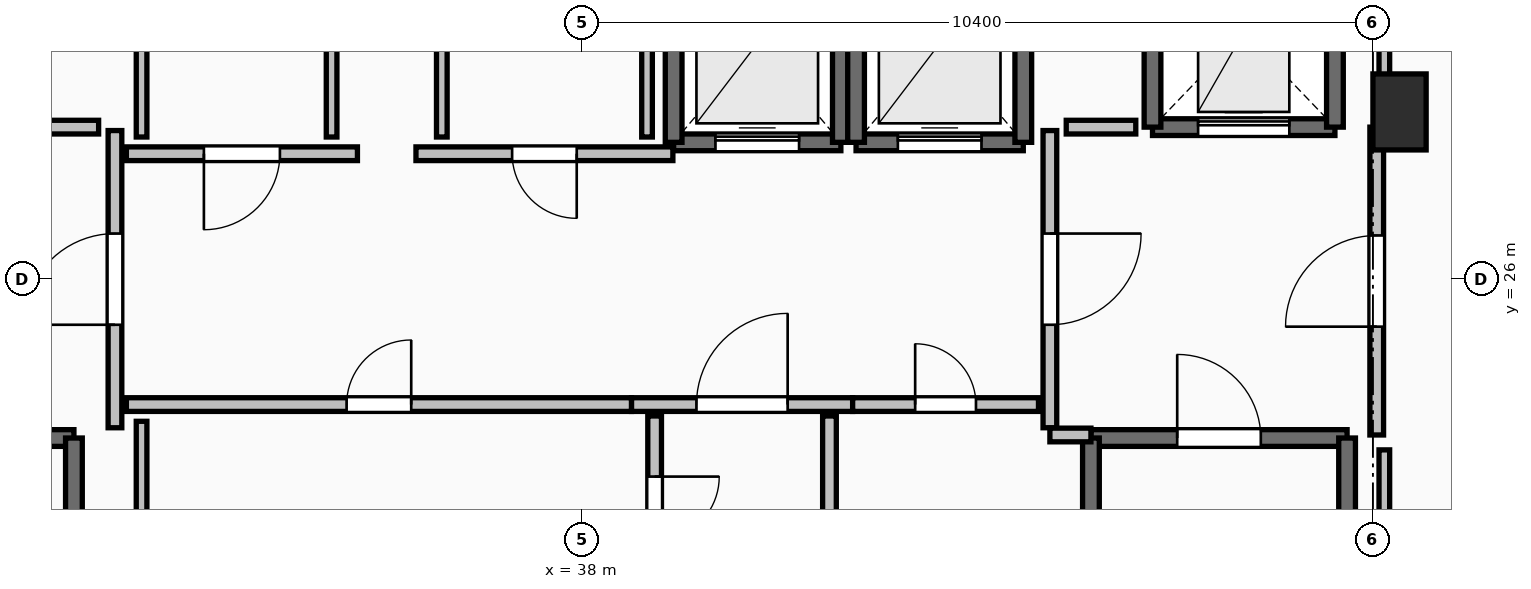
"""IFC4 building model, lengths in metres.
Left out: names, types, materials, properties, quantities, classifications, styles, units other than length and angle.
Written with IfcOpenShell. Run it as: python <this file> out.ifc"""

import sys

from ifc_helpers import new_model, si_unit, direction, frame, frame_2d, origin, origin_2d, place, context, subcontext, project, spatial, rectangle, extrude, element, fill, save


model = new_model("IFC4")
c1 = context("Model", 3, precision=1e-05, world=origin(), true_north=direction((0.0, 1.0)))
c2 = subcontext(c1, "Body", "Model", "MODEL_VIEW")
j1 = project(units=[si_unit("LENGTHUNIT", "METRE"), si_unit("PLANEANGLEUNIT", "RADIAN")], contexts=[c1])
p1 = place(None, origin())
s1 = spatial("IfcSite", under=j1, at=p1, CompositionType="ELEMENT")
p2 = place(p1, origin())
s2 = spatial("IfcBuilding", under=s1, at=p2, CompositionType="ELEMENT")
p3 = place(p2, frame((0.0, 0.0, 259.1)))
s3 = spatial("IfcBuildingStorey", under=s2, at=p3, CompositionType="ELEMENT", Elevation=259.1)
p4 = place(p3, frame((48.75, 28.2, 0.0), z_axis=(0.0, 0.0, 1.0), x_axis=(1.0, 0.0, 0.0)))
e1 = element("IfcColumn", 1, at=p4, inside=s3, PredefinedType="PILASTER", context=c2, shape_type="SweptSolid", body=[
    extrude(rectangle(XDim=0.7, YDim=1.0, at=origin_2d()), origin(), (0.0, 0.0, 1.0), 3.55),
])
p5 = place(p3, frame((27.94, 23.91, 0.0), z_axis=(0.0, 0.0, 1.0), x_axis=(1.0, 0.0, 0.0)))
e2 = element("IfcWall", 2, at=p5, inside=s3, PredefinedType="SOLIDWALL", context=c2, shape_type="SweptSolid", body=[
    extrude(rectangle(XDim=3.37, YDim=0.22, at=frame_2d((1.685, 0.0))), origin(), (0.0, 0.0, 1.0), 3.29),
])
p6 = place(p5, frame((1.135, 0.0, 0.0)))
e3 = element("IfcOpeningElement", 3, at=p6, cuts=e2, PredefinedType="OPENING", context=c2, shape_type="SweptSolid", body=[
    extrude(rectangle(XDim=1.1, YDim=2.15, at=frame_2d((0.55, 1.075))), frame((0.0, 0.125, 0.0), z_axis=(0.0, -1.0, 0.0), x_axis=(1.0, 0.0, 0.0)), (0.0, 0.0, 1.0), 0.25),
])
p7 = place(p3, frame((31.31, 23.91, 0.0), z_axis=(0.0, 0.0, 1.0), x_axis=(0.0, -1.0, 0.0)))
e4 = element("IfcWall", 4, at=p7, inside=s3, PredefinedType="SOLIDWALL", context=c2, shape_type="SweptSolid", body=[
    extrude(rectangle(XDim=7.42, YDim=0.22, at=frame_2d((3.71, 0.0))), origin(), (0.0, 0.0, 1.0), 3.29),
])
p8 = place(p3, frame((44.69, 23.91, 0.0), z_axis=(0.0, 0.0, 1.0), x_axis=(1.0, 0.0, 0.0)))
e5 = element("IfcWall", 5, at=p8, inside=s3, PredefinedType="SOLIDWALL", context=c2, shape_type="SweptSolid", body=[
    extrude(rectangle(XDim=3.37, YDim=0.22, at=frame_2d((1.685, 0.0))), origin(), (0.0, 0.0, 1.0), 3.29),
])
p9 = place(p8, frame((1.135, 0.0, 0.0)))
e6 = element("IfcOpeningElement", 6, at=p9, cuts=e5, PredefinedType="OPENING", context=c2, shape_type="SweptSolid", body=[
    extrude(rectangle(XDim=1.1, YDim=2.15, at=frame_2d((0.55, 1.075))), frame((0.0, 0.125, 0.0), z_axis=(0.0, -1.0, 0.0), x_axis=(1.0, 0.0, 0.0)), (0.0, 0.0, 1.0), 0.25),
])
for number, where, z_axis, x_axis in (
    (7, (48.06, 23.91, 0.0), (0.0, 0.0, 1.0), (0.0, -1.0, 0.0)),
    (8, (44.69, 16.49, 0.0), (0.0, 0.0, 1.0), (0.0, 1.0, 0.0)),
):
    element("IfcWall", number, at=place(p3, frame(where, z_axis=z_axis, x_axis=x_axis)), inside=s3, PredefinedType="SOLIDWALL", context=c2, shape_type="SweptSolid", body=[
        extrude(rectangle(XDim=7.42, YDim=0.22, at=frame_2d((3.71, 0.0))), origin(), (0.0, 0.0, 1.0), 3.29),
    ])
p10 = place(p3, frame((39.2, 27.8, 0.0), z_axis=(0.0, 0.0, 1.0), x_axis=(1.0, 0.0, 0.0)))
e9 = element("IfcWall", 9, at=p10, inside=s3, PredefinedType="SOLIDWALL", context=c2, shape_type="SweptSolid", body=[
    extrude(rectangle(XDim=2.2, YDim=0.22, at=frame_2d((1.1, 0.0))), origin(), (0.0, 0.0, 1.0), 3.29),
])
p11 = place(p10, frame((0.55, 0.0, 0.0)))
e10 = element("IfcOpeningElement", 10, at=p11, cuts=e9, PredefinedType="OPENING", context=c2, shape_type="SweptSolid", body=[
    extrude(rectangle(XDim=1.1, YDim=2.2, at=frame_2d((0.55, 1.1))), frame((0.0, 0.125, 0.0), z_axis=(0.0, -1.0, 0.0), x_axis=(1.0, 0.0, 0.0)), (0.0, 0.0, 1.0), 0.25),
])
for number, where, z_axis, x_axis in (
    (11, (41.4, 27.8, 0.0), (0.0, 0.0, 1.0), (0.0, 1.0, 0.0)),
    (12, (39.2, 30.4, 0.0), (0.0, 0.0, 1.0), (0.0, -1.0, 0.0)),
):
    element("IfcWall", number, at=place(p3, frame(where, z_axis=z_axis, x_axis=x_axis)), inside=s3, PredefinedType="SOLIDWALL", context=c2, shape_type="SweptSolid", body=[
        extrude(rectangle(XDim=2.6, YDim=0.22, at=frame_2d((1.3, 0.0))), origin(), (0.0, 0.0, 1.0), 3.29),
    ])
p12 = place(p3, frame((41.6, 27.8, 0.0), z_axis=(0.0, 0.0, 1.0), x_axis=(1.0, 0.0, 0.0)))
e13 = element("IfcWall", 13, at=p12, inside=s3, PredefinedType="SOLIDWALL", context=c2, shape_type="SweptSolid", body=[
    extrude(rectangle(XDim=2.2, YDim=0.22, at=frame_2d((1.1, 0.0))), origin(), (0.0, 0.0, 1.0), 3.29),
])
p13 = place(p12, frame((0.55, 0.0, 0.0)))
e14 = element("IfcOpeningElement", 14, at=p13, cuts=e13, PredefinedType="OPENING", context=c2, shape_type="SweptSolid", body=[
    extrude(rectangle(XDim=1.1, YDim=2.2, at=frame_2d((0.55, 1.1))), frame((0.0, 0.125, 0.0), z_axis=(0.0, -1.0, 0.0), x_axis=(1.0, 0.0, 0.0)), (0.0, 0.0, 1.0), 0.25),
])
for number, where, z_axis, x_axis in (
    (15, (43.8, 27.8, 0.0), (0.0, 0.0, 1.0), (0.0, 1.0, 0.0)),
    (16, (41.6, 30.4, 0.0), (0.0, 0.0, 1.0), (0.0, -1.0, 0.0)),
):
    element("IfcWall", number, at=place(p3, frame(where, z_axis=z_axis, x_axis=x_axis)), inside=s3, PredefinedType="SOLIDWALL", context=c2, shape_type="SweptSolid", body=[
        extrude(rectangle(XDim=2.6, YDim=0.22, at=frame_2d((1.3, 0.0))), origin(), (0.0, 0.0, 1.0), 3.29),
    ])
p14 = place(p3, frame((45.5, 28.0, 0.0), z_axis=(0.0, 0.0, 1.0), x_axis=(1.0, 0.0, 0.0)))
e17 = element("IfcWall", 17, at=p14, inside=s3, PredefinedType="SHEAR", context=c2, shape_type="SweptSolid", body=[
    extrude(rectangle(XDim=2.4, YDim=0.22, at=frame_2d((1.2, 0.0))), origin(), (0.0, 0.0, 1.0), 3.29),
])
p15 = place(p14, frame((0.6, 0.0, 0.0)))
e18 = element("IfcOpeningElement", 18, at=p15, cuts=e17, PredefinedType="OPENING", context=c2, shape_type="SweptSolid", body=[
    extrude(rectangle(XDim=1.2, YDim=2.2, at=frame_2d((0.6, 1.1))), frame((0.0, 0.125, 0.0), z_axis=(0.0, -1.0, 0.0), x_axis=(1.0, 0.0, 0.0)), (0.0, 0.0, 1.0), 0.25),
])
for number, where, z_axis, x_axis in (
    (19, (47.9, 28.0, 0.0), (0.0, 0.0, 1.0), (0.0, 1.0, 0.0)),
    (20, (45.5, 30.5, 0.0), (0.0, 0.0, 1.0), (0.0, -1.0, 0.0)),
):
    element("IfcWall", number, at=place(p3, frame(where, z_axis=z_axis, x_axis=x_axis)), inside=s3, PredefinedType="SHEAR", context=c2, shape_type="SweptSolid", body=[
        extrude(rectangle(XDim=2.5, YDim=0.22, at=frame_2d((1.25, 0.0))), origin(), (0.0, 0.0, 1.0), 3.29),
    ])
p16 = place(p3, frame((31.85, 24.045, 0.0), z_axis=(0.0, 0.0, 1.0), x_axis=(0.0, 1.0, 0.0)))
e21 = element("IfcWall", 21, at=p16, inside=s3, PredefinedType="PARTITIONING", context=c2, shape_type="SweptSolid", body=[
    extrude(rectangle(XDim=3.91, YDim=0.18, at=frame_2d((1.955, 0.0))), origin(), (0.0, 0.0, 1.0), 3.29),
])
p17 = place(p16, frame((1.355, 0.0, 0.0)))
e22 = element("IfcOpeningElement", 22, at=p17, cuts=e21, PredefinedType="OPENING", context=c2, shape_type="SweptSolid", body=[
    extrude(rectangle(XDim=1.2, YDim=2.15, at=frame_2d((0.6, 1.075))), frame((0.0, 0.105, 0.0), z_axis=(0.0, -1.0, 0.0), x_axis=(1.0, 0.0, 0.0)), (0.0, 0.0, 1.0), 0.21),
])
p18 = place(p3, frame((44.15, 27.955, 0.0), z_axis=(0.0, 0.0, 1.0), x_axis=(0.0, -1.0, 0.0)))
e23 = element("IfcWall", 23, at=p18, inside=s3, PredefinedType="PARTITIONING", context=c2, shape_type="SweptSolid", body=[
    extrude(rectangle(XDim=3.91, YDim=0.18, at=frame_2d((1.955, 0.0))), origin(), (0.0, 0.0, 1.0), 3.29),
])
p19 = place(p18, frame((1.355, 0.0, 0.0)))
e24 = element("IfcOpeningElement", 24, at=p19, cuts=e23, PredefinedType="OPENING", context=c2, shape_type="SweptSolid", body=[
    extrude(rectangle(XDim=1.2, YDim=2.15, at=frame_2d((0.6, 1.075))), frame((0.0, 0.105, 0.0), z_axis=(0.0, -1.0, 0.0), x_axis=(1.0, 0.0, 0.0)), (0.0, 0.0, 1.0), 0.21),
])
p20 = place(p3, frame((44.15, 23.95, 0.0), z_axis=(0.0, 0.0, 1.0), x_axis=(1.0, 0.0, 0.0)))
e25 = element("IfcWall", 25, at=p20, inside=s3, PredefinedType="PARTITIONING", context=c2, shape_type="SweptSolid", body=[
    extrude(rectangle(XDim=0.54, YDim=0.18, at=frame_2d((0.27, 0.0))), origin(), (0.0, 0.0, 1.0), 3.29),
])
p21 = place(p3, frame((48.45, 23.95, 0.0), z_axis=(0.0, 0.0, 1.0), x_axis=(0.0, 1.0, 0.0)))
e26 = element("IfcWall", 26, at=p21, inside=s3, PredefinedType="PARTITIONING", context=c2, shape_type="SweptSolid", body=[
    extrude(rectangle(XDim=4.05, YDim=0.18, at=frame_2d((2.025, 0.0))), origin(), (0.0, 0.0, 1.0), 3.29),
])
p22 = place(p21, frame((1.425, 0.0, 0.0)))
e27 = element("IfcOpeningElement", 27, at=p22, cuts=e26, PredefinedType="OPENING", context=c2, shape_type="SweptSolid", body=[
    extrude(rectangle(XDim=1.2, YDim=2.15, at=frame_2d((0.6, 1.075))), frame((0.0, 0.105, 0.0), z_axis=(0.0, -1.0, 0.0), x_axis=(1.0, 0.0, 0.0)), (0.0, 0.0, 1.0), 0.21),
])
p23 = place(p3, frame((38.645, 24.35, 0.0), z_axis=(0.0, 0.0, 1.0), x_axis=(1.0, 0.0, 0.0)))
e28 = element("IfcWall", 28, at=p23, inside=s3, PredefinedType="PARTITIONING", context=c2, shape_type="SweptSolid", body=[
    extrude(rectangle(XDim=2.91, YDim=0.18, at=frame_2d((1.455, 0.0))), origin(), (0.0, 0.0, 1.0), 3.29),
])
p24 = place(p23, frame((0.855, 0.0, 0.0)))
e29 = element("IfcOpeningElement", 29, at=p24, cuts=e28, PredefinedType="OPENING", context=c2, shape_type="SweptSolid", body=[
    extrude(rectangle(XDim=1.2, YDim=2.15, at=frame_2d((0.6, 1.075))), frame((0.0, 0.105, 0.0), z_axis=(0.0, -1.0, 0.0), x_axis=(1.0, 0.0, 0.0)), (0.0, 0.0, 1.0), 0.21),
])
p25 = place(p3, frame((41.555, 24.35, 0.0), z_axis=(0.0, 0.0, 1.0), x_axis=(1.0, 0.0, 0.0)))
e30 = element("IfcWall", 30, at=p25, inside=s3, PredefinedType="PARTITIONING", context=c2, shape_type="SweptSolid", body=[
    extrude(rectangle(XDim=2.445, YDim=0.18, at=frame_2d((1.223, 0.0))), origin(), (0.0, 0.0, 1.0), 3.29),
])
p26 = place(p25, frame((0.823, 0.0, 0.0)))
e31 = element("IfcOpeningElement", 31, at=p26, cuts=e30, PredefinedType="OPENING", context=c2, shape_type="SweptSolid", body=[
    extrude(rectangle(XDim=0.8, YDim=2.05, at=frame_2d((0.4, 1.025))), frame((0.0, 0.105, 0.0), z_axis=(0.0, -1.0, 0.0), x_axis=(1.0, 0.0, 0.0)), (0.0, 0.0, 1.0), 0.21),
])
p27 = place(p3, frame((35.04, 27.65, 0.0), z_axis=(0.0, 0.0, 1.0), x_axis=(-1.0, 0.0, 0.0)))
e32 = element("IfcWall", 32, at=p27, inside=s3, PredefinedType="PARTITIONING", context=c2, shape_type="SweptSolid", body=[
    extrude(rectangle(XDim=3.04, YDim=0.18, at=frame_2d((1.52, 0.0))), origin(), (0.0, 0.0, 1.0), 3.29),
])
p28 = place(p27, frame((1.02, 0.0, 0.0)))
e33 = element("IfcOpeningElement", 33, at=p28, cuts=e32, PredefinedType="OPENING", context=c2, shape_type="SweptSolid", body=[
    extrude(rectangle(XDim=1.0, YDim=2.15, at=frame_2d((0.5, 1.075))), frame((0.0, 0.105, 0.0), z_axis=(0.0, -1.0, 0.0), x_axis=(1.0, 0.0, 0.0)), (0.0, 0.0, 1.0), 0.21),
])
p29 = place(p3, frame((39.19, 27.65, 0.0), z_axis=(0.0, 0.0, 1.0), x_axis=(-1.0, 0.0, 0.0)))
e34 = element("IfcWall", 34, at=p29, inside=s3, PredefinedType="PARTITIONING", context=c2, shape_type="SweptSolid", body=[
    extrude(rectangle(XDim=3.38, YDim=0.18, at=frame_2d((1.69, 0.0))), origin(), (0.0, 0.0, 1.0), 3.29),
])
p30 = place(p29, frame((1.265, 0.0, 0.0)))
e35 = element("IfcOpeningElement", 35, at=p30, cuts=e34, PredefinedType="OPENING", context=c2, shape_type="SweptSolid", body=[
    extrude(rectangle(XDim=0.85, YDim=2.1, at=frame_2d((0.425, 1.05))), frame((0.0, 0.105, 0.0), z_axis=(0.0, -1.0, 0.0), x_axis=(1.0, 0.0, 0.0)), (0.0, 0.0, 1.0), 0.21),
])
p31 = place(p3, frame((32.0, 24.35, 0.0), z_axis=(0.0, 0.0, 1.0), x_axis=(1.0, 0.0, 0.0)))
e36 = element("IfcWall", 36, at=p31, inside=s3, PredefinedType="PARTITIONING", context=c2, shape_type="SweptSolid", body=[
    extrude(rectangle(XDim=6.645, YDim=0.18, at=frame_2d((3.323, 0.0))), origin(), (0.0, 0.0, 1.0), 3.29),
])
p32 = place(p31, frame((2.897, 0.0, 0.0)))
e37 = element("IfcOpeningElement", 37, at=p32, cuts=e36, PredefinedType="OPENING", context=c2, shape_type="SweptSolid", body=[
    extrude(rectangle(XDim=0.85, YDim=2.1, at=frame_2d((0.425, 1.05))), frame((0.0, 0.105, 0.0), z_axis=(0.0, -1.0, 0.0), x_axis=(1.0, 0.0, 0.0)), (0.0, 0.0, 1.0), 0.21),
])
p33 = place(p3, frame((41.25, 16.32, 0.0), z_axis=(0.0, 0.0, 1.0), x_axis=(0.0, 1.0, 0.0)))
e38 = element("IfcWall", 38, at=p33, inside=s3, PredefinedType="PARTITIONING", context=c2, shape_type="SweptSolid", body=[
    extrude(rectangle(XDim=7.88, YDim=0.18, at=frame_2d((3.94, 0.0))), origin(), (0.0, 0.0, 1.0), 2.482),
])
p34 = place(p33, frame((3.54, 0.0, 0.0)))
e39 = element("IfcOpeningElement", 39, at=p34, cuts=e38, PredefinedType="OPENING", context=c2, shape_type="SweptSolid", body=[
    extrude(rectangle(XDim=0.8, YDim=2.05, at=frame_2d((0.4, 1.025))), frame((0.0, 0.105, 0.0), z_axis=(0.0, -1.0, 0.0), x_axis=(1.0, 0.0, 0.0)), (0.0, 0.0, 1.0), 0.21),
])
p35 = place(p3, frame((38.95, 24.2, 0.0), z_axis=(0.0, 0.0, 1.0), x_axis=(0.0, -1.0, 0.0)))
e40 = element("IfcWall", 40, at=p35, inside=s3, PredefinedType="PARTITIONING", context=c2, shape_type="SweptSolid", body=[
    extrude(rectangle(XDim=2.445, YDim=0.18, at=frame_2d((1.223, 0.0))), origin(), (0.0, 0.0, 1.0), 2.482),
])
p36 = place(p35, frame((0.798, 0.0, 0.0)))
e41 = element("IfcOpeningElement", 41, at=p36, cuts=e40, PredefinedType="OPENING", context=c2, shape_type="SweptSolid", body=[
    extrude(rectangle(XDim=0.85, YDim=2.1, at=frame_2d((0.425, 1.05))), frame((0.0, 0.105, 0.0), z_axis=(0.0, -1.0, 0.0), x_axis=(1.0, 0.0, 0.0)), (0.0, 0.0, 1.0), 0.21),
])
for number, where, z_axis, x_axis in (
    (42, (31.635, 28.0, 0.0), (0.0, 0.0, 1.0), (-1.0, 0.0, 0.0)),
    (43, (45.28, 28.0, 0.0), (0.0, 0.0, 1.0), (-1.0, 0.0, 0.0)),
):
    element("IfcWall", number, at=place(p3, frame(where, z_axis=z_axis, x_axis=x_axis)), inside=s3, PredefinedType="PARTITIONING", context=c2, shape_type="SweptSolid", body=[
        extrude(rectangle(XDim=0.915, YDim=0.18, at=frame_2d((0.458, 0.0))), origin(), (0.0, 0.0, 1.0), 3.29),
    ])
for number, where, z_axis, x_axis in (
    (44, (32.2, 30.26, 0.0), (0.0, 0.0, 1.0), (0.0, -1.0, 0.0)),
    (45, (34.7, 27.87, 0.0), (0.0, 0.0, 1.0), (0.0, 1.0, 0.0)),
):
    element("IfcWall", number, at=place(p3, frame(where, z_axis=z_axis, x_axis=x_axis)), inside=s3, PredefinedType="PARTITIONING", context=c2, shape_type="SweptSolid", body=[
        extrude(rectangle(XDim=2.39, YDim=0.14, at=frame_2d((1.195, 0.0))), origin(), (0.0, 0.0, 1.0), 3.29),
    ])
p37 = place(p3, frame((36.15, 30.03, 0.0), z_axis=(0.0, 0.0, 1.0), x_axis=(0.0, -1.0, 0.0)))
e46 = element("IfcWall", 46, at=p37, inside=s3, PredefinedType="PARTITIONING", context=c2, shape_type="SweptSolid", body=[
    extrude(rectangle(XDim=2.16, YDim=0.14, at=frame_2d((1.08, 0.0))), origin(), (0.0, 0.0, 1.0), 3.29),
])
p38 = place(p3, frame((38.85, 27.87, 0.0), z_axis=(0.0, 0.0, 1.0), x_axis=(0.0, 1.0, 0.0)))
e47 = element("IfcWall", 47, at=p38, inside=s3, PredefinedType="PARTITIONING", context=c2, shape_type="SweptSolid", body=[
    extrude(rectangle(XDim=2.39, YDim=0.14, at=frame_2d((1.195, 0.0))), origin(), (0.0, 0.0, 1.0), 3.29),
])
p39 = place(p3, frame((32.2, 24.13, 0.0), z_axis=(0.0, 0.0, 1.0), x_axis=(0.0, -1.0, 0.0)))
e48 = element("IfcWall", 48, at=p39, inside=s3, PredefinedType="PARTITIONING", context=c2, shape_type="SweptSolid", body=[
    extrude(rectangle(XDim=2.46, YDim=0.14, at=frame_2d((1.23, 0.0))), origin(), (0.0, 0.0, 1.0), 2.482),
])
p40 = place(p3, frame((48.55, 16.24, 0.0), z_axis=(0.0, 0.0, 1.0), x_axis=(0.0, 1.0, 0.0)))
e49 = element("IfcWall", 49, at=p40, inside=s3, PredefinedType="PARTITIONING", context=c2, shape_type="SweptSolid", body=[
    extrude(rectangle(XDim=7.514, YDim=0.14, at=frame_2d((3.757, 0.0))), origin(), (0.0, 0.0, 1.0), 2.482),
])
p41 = place(p3, frame((48.55, 28.196, 0.0), z_axis=(0.0, 0.0, 1.0), x_axis=(0.0, 1.0, 0.0)))
e50 = element("IfcWall", 50, at=p41, inside=s3, PredefinedType="PARTITIONING", context=c2, shape_type="SweptSolid", body=[
    extrude(rectangle(XDim=5.254, YDim=0.14, at=frame_2d((2.627, 0.0))), origin(), (0.0, 0.0, 1.0), 2.482),
])
p42 = place(p9, origin())
e51 = element("IfcDoor", 51, at=p42, inside=s3, OperationType="SINGLE_SWING_LEFT", PredefinedType="DOOR", context=c2, shape_type="SweptSolid", body=[
    extrude(rectangle(XDim=1.1, YDim=2.15, at=frame_2d((0.55, 1.075))), frame((0.0, 0.025, 0.0), z_axis=(0.0, -1.0, 0.0), x_axis=(1.0, 0.0, 0.0)), (0.0, 0.0, 1.0), 0.05),
])
fill(e6, e51)
p43 = place(p11, origin())
e52 = element("IfcDoor", 52, at=p43, inside=s3, OperationType="SLIDING_TO_LEFT", PredefinedType="DOOR", context=c2, shape_type="SweptSolid", body=[
    extrude(rectangle(XDim=1.1, YDim=2.2, at=frame_2d((0.55, 1.1))), frame((0.0, 0.025, 0.0), z_axis=(0.0, -1.0, 0.0), x_axis=(1.0, 0.0, 0.0)), (0.0, 0.0, 1.0), 0.05),
])
fill(e10, e52)
p44 = place(p13, origin())
e53 = element("IfcDoor", 53, at=p44, inside=s3, OperationType="SLIDING_TO_LEFT", PredefinedType="DOOR", context=c2, shape_type="SweptSolid", body=[
    extrude(rectangle(XDim=1.1, YDim=2.2, at=frame_2d((0.55, 1.1))), frame((0.0, 0.025, 0.0), z_axis=(0.0, -1.0, 0.0), x_axis=(1.0, 0.0, 0.0)), (0.0, 0.0, 1.0), 0.05),
])
fill(e14, e53)
p45 = place(p15, origin())
e54 = element("IfcDoor", 54, at=p45, inside=s3, OperationType="SLIDING_TO_LEFT", PredefinedType="DOOR", context=c2, shape_type="SweptSolid", body=[
    extrude(rectangle(XDim=1.2, YDim=2.2, at=frame_2d((0.6, 1.1))), frame((0.0, 0.025, 0.0), z_axis=(0.0, -1.0, 0.0), x_axis=(1.0, 0.0, 0.0)), (0.0, 0.0, 1.0), 0.05),
])
fill(e18, e54)
p46 = place(p17, origin())
e55 = element("IfcDoor", 55, at=p46, inside=s3, OperationType="SINGLE_SWING_LEFT", PredefinedType="DOOR", context=c2, shape_type="SweptSolid", body=[
    extrude(rectangle(XDim=1.2, YDim=2.15, at=frame_2d((0.6, 1.075))), frame((0.0, 0.025, 0.0), z_axis=(0.0, -1.0, 0.0), x_axis=(1.0, 0.0, 0.0)), (0.0, 0.0, 1.0), 0.05),
])
fill(e22, e55)
p47 = place(p19, origin())
e56 = element("IfcDoor", 56, at=p47, inside=s3, OperationType="SINGLE_SWING_LEFT", PredefinedType="DOOR", context=c2, shape_type="SweptSolid", body=[
    extrude(rectangle(XDim=1.2, YDim=2.15, at=frame_2d((0.6, 1.075))), frame((0.0, 0.025, 0.0), z_axis=(0.0, -1.0, 0.0), x_axis=(1.0, 0.0, 0.0)), (0.0, 0.0, 1.0), 0.05),
])
fill(e24, e56)
p48 = place(p22, origin())
e57 = element("IfcDoor", 57, at=p48, inside=s3, OperationType="SINGLE_SWING_LEFT", PredefinedType="DOOR", context=c2, shape_type="SweptSolid", body=[
    extrude(rectangle(XDim=1.2, YDim=2.15, at=frame_2d((0.6, 1.075))), frame((0.0, 0.025, 0.0), z_axis=(0.0, -1.0, 0.0), x_axis=(1.0, 0.0, 0.0)), (0.0, 0.0, 1.0), 0.05),
])
fill(e27, e57)
p49 = place(p24, origin())
e58 = element("IfcDoor", 58, at=p49, inside=s3, OperationType="SINGLE_SWING_RIGHT", PredefinedType="DOOR", context=c2, shape_type="SweptSolid", body=[
    extrude(rectangle(XDim=1.2, YDim=2.15, at=frame_2d((0.6, 1.075))), frame((0.0, 0.025, 0.0), z_axis=(0.0, -1.0, 0.0), x_axis=(1.0, 0.0, 0.0)), (0.0, 0.0, 1.0), 0.05),
])
fill(e29, e58)
p50 = place(p26, origin())
e59 = element("IfcDoor", 59, at=p50, inside=s3, OperationType="SINGLE_SWING_LEFT", PredefinedType="DOOR", context=c2, shape_type="SweptSolid", body=[
    extrude(rectangle(XDim=0.8, YDim=2.05, at=frame_2d((0.4, 1.025))), frame((0.0, 0.025, 0.0), z_axis=(0.0, -1.0, 0.0), x_axis=(1.0, 0.0, 0.0)), (0.0, 0.0, 1.0), 0.05),
])
fill(e31, e59)
p51 = place(p28, origin())
e60 = element("IfcDoor", 60, at=p51, inside=s3, OperationType="SINGLE_SWING_RIGHT", PredefinedType="DOOR", context=c2, shape_type="SweptSolid", body=[
    extrude(rectangle(XDim=1.0, YDim=2.15, at=frame_2d((0.5, 1.075))), frame((0.0, 0.025, 0.0), z_axis=(0.0, -1.0, 0.0), x_axis=(1.0, 0.0, 0.0)), (0.0, 0.0, 1.0), 0.05),
])
fill(e33, e60)
p52 = place(p30, origin())
e61 = element("IfcDoor", 61, at=p52, inside=s3, OperationType="SINGLE_SWING_LEFT", PredefinedType="DOOR", context=c2, shape_type="SweptSolid", body=[
    extrude(rectangle(XDim=0.85, YDim=2.1, at=frame_2d((0.425, 1.05))), frame((0.0, 0.025, 0.0), z_axis=(0.0, -1.0, 0.0), x_axis=(1.0, 0.0, 0.0)), (0.0, 0.0, 1.0), 0.05),
])
fill(e35, e61)
p53 = place(p32, origin())
e62 = element("IfcDoor", 62, at=p53, inside=s3, OperationType="SINGLE_SWING_RIGHT", PredefinedType="DOOR", context=c2, shape_type="SweptSolid", body=[
    extrude(rectangle(XDim=0.85, YDim=2.1, at=frame_2d((0.425, 1.05))), frame((0.0, 0.025, 0.0), z_axis=(0.0, -1.0, 0.0), x_axis=(1.0, 0.0, 0.0)), (0.0, 0.0, 1.0), 0.05),
])
fill(e37, e62)
p54 = place(p36, origin())
e63 = element("IfcDoor", 63, at=p54, inside=s3, OperationType="SINGLE_SWING_LEFT", PredefinedType="DOOR", context=c2, shape_type="SweptSolid", body=[
    extrude(rectangle(XDim=0.85, YDim=2.1, at=frame_2d((0.425, 1.05))), frame((0.0, 0.025, 0.0), z_axis=(0.0, -1.0, 0.0), x_axis=(1.0, 0.0, 0.0)), (0.0, 0.0, 1.0), 0.05),
])
fill(e41, e63)
save(model, sys.argv[1])
